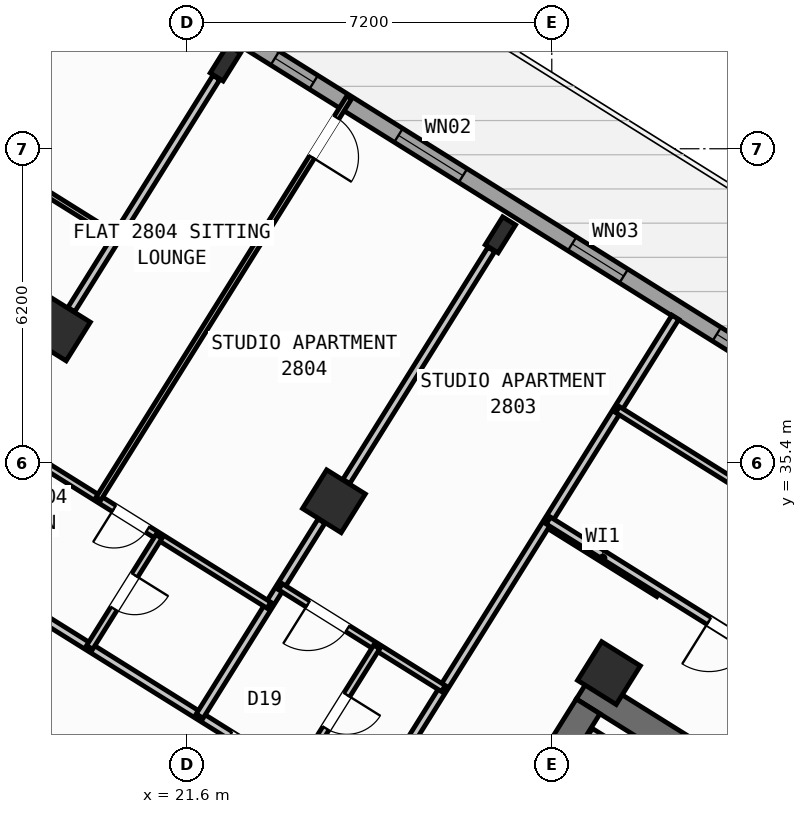
"""IFC4 building model, lengths in metres.
Left out: names, types, materials, properties, quantities, classifications, styles, units other than length and angle.
Written with IfcOpenShell. Run it as: python <this file> out.ifc"""

import sys

from ifc_helpers import new_model, si_unit, direction, frame, frame_2d, origin, origin_2d, place, context, subcontext, project, spatial, rectangle, hollow_rectangle, i_section, extrude, source, transform, mapped, element, fill, save


model = new_model("IFC4")
c1 = context("Model", 3, precision=1e-05, world=origin(), true_north=direction((0.0, 1.0)))
c2 = subcontext(c1, "Body", "Model", "MODEL_VIEW")
j1 = project(units=[si_unit("LENGTHUNIT", "METRE"), si_unit("PLANEANGLEUNIT", "RADIAN")], contexts=[c1])
p1 = place(None, origin())
s1 = spatial("IfcSite", under=j1, at=p1, CompositionType="ELEMENT")
p2 = place(p1, origin())
s2 = spatial("IfcBuilding", under=s1, at=p2, CompositionType="ELEMENT")
p3 = place(p2, frame((0.0, 0.0, 112.5)))
s3 = spatial("IfcBuildingStorey", under=s2, at=p3, CompositionType="ELEMENT", Elevation=112.5)
p4 = place(p3, frame((40.573, 24.01, 0.0), z_axis=(0.0, 0.0, 1.0), x_axis=(-0.848047359947, 0.529920442413, 0.0)))
e1 = element("IfcWall", 1, at=p4, inside=s3, PredefinedType="SHEAR", context=c2, shape_type="SweptSolid", body=[
    extrude(rectangle(XDim=13.14, YDim=0.55, at=frame_2d((6.57, 0.0))), origin(), (0.0, 0.0, 1.0), 3.35),
])
p5 = place(p3, frame((29.517, 30.594, 0.0), z_axis=(0.0, 0.0, 1.0), x_axis=(-0.529906864564, -0.848055844204, 0.0)))
e2 = element("IfcWall", 2, at=p5, inside=s3, PredefinedType="SHEAR", context=c2, shape_type="SweptSolid", body=[
    extrude(rectangle(XDim=3.575, YDim=0.55, at=frame_2d((1.788, 0.0))), origin(), (0.0, 0.0, 1.0), 3.35),
])
m1 = source(origin(), c2, "Body", "SweptSolid", [
    extrude(hollow_rectangle(XDim=0.9, YDim=0.9, WallThickness=0.036, at=origin_2d()), origin(), (0.0, 0.0, 1.0), 3.6),
])
p6 = place(p3, frame((29.928, 31.251, 0.0), z_axis=(0.0, 0.0, 1.0), x_axis=(-0.848048096156, 0.529919264233, 0.0)))
e3 = element("IfcColumn", 3, at=p6, inside=s3, PredefinedType="COLUMN", context=c2, shape_type="MappedRepresentation", body=[
    mapped(m1, transform((0.0, 0.0, 0.0), scale=1.0)),
])
m2 = source(origin(), c2, "Body", "SweptSolid", [
    extrude(i_section(OverallWidth=0.3, OverallDepth=0.65, WebThickness=0.016, FlangeThickness=0.031, at=origin_2d()), origin(), (0.0, 0.0, 1.0), 3.6),
])
p7 = place(p3, frame((27.786, 39.901, 0.0), z_axis=(0.0, 0.0, 1.0), x_axis=(-0.848048096156, 0.529919264233, 0.0)))
e4 = element("IfcColumn", 4, at=p7, inside=s3, PredefinedType="COLUMN", context=c2, shape_type="MappedRepresentation", body=[
    mapped(m2, transform((0.0, 0.0, 0.0), scale=1.0)),
])
p8 = place(p3, frame((24.5, 34.643, 0.0), z_axis=(0.0, 0.0, 1.0), x_axis=(-0.848048096156, 0.529919264233, 0.0)))
e5 = element("IfcColumn", 5, at=p8, inside=s3, PredefinedType="COLUMN", context=c2, shape_type="MappedRepresentation", body=[
    mapped(m1, transform((0.0, 0.0, 0.0), scale=1.0)),
])
p9 = place(p3, frame((22.358, 43.292, 0.0), z_axis=(0.0, 0.0, 1.0), x_axis=(-0.848048096156, 0.529919264233, 0.0)))
e6 = element("IfcColumn", 6, at=p9, inside=s3, PredefinedType="COLUMN", context=c2, shape_type="MappedRepresentation", body=[
    mapped(m2, transform((0.0, 0.0, 0.0), scale=1.0)),
])
p10 = place(p3, frame((19.073, 38.034, 0.0), z_axis=(0.0, 0.0, 1.0), x_axis=(-0.848048096156, 0.529919264233, 0.0)))
e7 = element("IfcColumn", 7, at=p10, inside=s3, PredefinedType="COLUMN", context=c2, shape_type="MappedRepresentation", body=[
    mapped(m1, transform((0.0, 0.0, 0.0), scale=1.0)),
])
p11 = place(p3, frame((17.424, 47.083, 0.0), z_axis=(0.0, 0.0, 1.0), x_axis=(0.848049927979, -0.529916332693, 0.0)))
e8 = element("IfcWall", 8, at=p11, inside=s3, PredefinedType="STANDARD", context=c2, shape_type="SweptSolid", body=[
    extrude(rectangle(XDim=29.223, YDim=0.32, at=frame_2d((14.612, 0.0))), origin(), (0.0, 0.0, 1.0), 3.35),
])
p12 = place(p11, frame((3.77, 0.0, 0.0)))
e9 = element("IfcOpeningElement", 9, at=p12, cuts=e8, PredefinedType="OPENING", context=c2, shape_type="SweptSolid", body=[
    extrude(rectangle(XDim=1.05, YDim=2.15, at=frame_2d((0.525, 1.075))), frame((0.0, 0.17, 0.0), z_axis=(0.0, -1.0, 0.0), x_axis=(1.0, 0.0, 0.0)), (0.0, 0.0, 1.0), 0.34),
])
p13 = place(p11, frame((0.9, 0.0, 0.8)))
e10 = element("IfcOpeningElement", 10, at=p13, cuts=e8, PredefinedType="OPENING", context=c2, shape_type="SweptSolid", body=[
    extrude(rectangle(XDim=2.1, YDim=1.55, at=frame_2d((1.05, 0.775))), frame((0.0, 0.17, 0.0), z_axis=(0.0, -1.0, 0.0), x_axis=(1.0, 0.0, 0.0)), (0.0, 0.0, 1.0), 0.34),
])
p14 = place(p11, frame((6.972, 0.0, 1.0)))
e11 = element("IfcOpeningElement", 11, at=p14, cuts=e8, PredefinedType="OPENING", context=c2, shape_type="SweptSolid", body=[
    extrude(rectangle(XDim=0.9, YDim=1.25, at=frame_2d((0.45, 0.625))), frame((0.0, 0.17, 0.0), z_axis=(0.0, -1.0, 0.0), x_axis=(1.0, 0.0, 0.0)), (0.0, 0.0, 1.0), 0.34),
])
p15 = place(p11, frame((9.847, 0.0, 0.85)))
e12 = element("IfcOpeningElement", 12, at=p15, cuts=e8, PredefinedType="OPENING", context=c2, shape_type="SweptSolid", body=[
    extrude(rectangle(XDim=1.5, YDim=1.5, at=frame_2d((0.75, 0.75))), frame((0.0, 0.17, 0.0), z_axis=(0.0, -1.0, 0.0), x_axis=(1.0, 0.0, 0.0)), (0.0, 0.0, 1.0), 0.34),
])
p16 = place(p11, frame((13.889, 0.0, 0.95)))
e13 = element("IfcOpeningElement", 13, at=p16, cuts=e8, PredefinedType="OPENING", context=c2, shape_type="SweptSolid", body=[
    extrude(rectangle(XDim=1.2, YDim=1.4, at=frame_2d((0.6, 0.7))), frame((0.0, 0.17, 0.0), z_axis=(0.0, -1.0, 0.0), x_axis=(1.0, 0.0, 0.0)), (0.0, 0.0, 1.0), 0.34),
])
p17 = place(p11, frame((17.254, 0.0, 1.0)))
e14 = element("IfcOpeningElement", 14, at=p17, cuts=e8, PredefinedType="OPENING", context=c2, shape_type="SweptSolid", body=[
    extrude(rectangle(XDim=0.9, YDim=1.25, at=frame_2d((0.45, 0.625))), frame((0.0, 0.17, 0.0), z_axis=(0.0, -1.0, 0.0), x_axis=(1.0, 0.0, 0.0)), (0.0, 0.0, 1.0), 0.34),
])
p18 = place(p11, frame((20.764, 0.0, 0.8)))
e15 = element("IfcOpeningElement", 15, at=p18, cuts=e8, PredefinedType="OPENING", context=c2, shape_type="SweptSolid", body=[
    extrude(rectangle(XDim=2.1, YDim=1.55, at=frame_2d((1.05, 0.775))), frame((0.0, 0.17, 0.0), z_axis=(0.0, -1.0, 0.0), x_axis=(1.0, 0.0, 0.0)), (0.0, 0.0, 1.0), 0.34),
])
p19 = place(p11, frame((25.403, 0.0, 0.8)))
e16 = element("IfcOpeningElement", 16, at=p19, cuts=e8, PredefinedType="OPENING", context=c2, shape_type="SweptSolid", body=[
    extrude(rectangle(XDim=2.1, YDim=1.55, at=frame_2d((1.05, 0.775))), frame((0.0, 0.17, 0.0), z_axis=(0.0, -1.0, 0.0), x_axis=(1.0, 0.0, 0.0)), (0.0, 0.0, 1.0), 0.34),
])
p20 = place(p3, frame((33.363, 27.69, 0.0), z_axis=(0.0, 0.0, 1.0), x_axis=(-0.848047090064, 0.529920874315, 0.0)))
e17 = element("IfcWall", 17, at=p20, inside=s3, PredefinedType="STANDARD", context=c2, shape_type="SweptSolid", body=[
    extrude(rectangle(XDim=4.498, YDim=0.2, at=frame_2d((2.249, 0.0))), origin(), (0.0, 0.0, 1.0), 3.34),
])
p21 = place(p3, frame((30.914, 32.829, 0.0), z_axis=(0.0, 0.0, 1.0), x_axis=(-0.848008813643, 0.529982124211, 0.0)))
e18 = element("IfcWall", 18, at=p21, inside=s3, PredefinedType="PARTITIONING", context=c2, shape_type="SweptSolid", body=[
    extrude(rectangle(XDim=2.61, YDim=0.16, at=frame_2d((1.305, 0.0))), origin(), (0.0, 0.0, 1.0), 3.34),
])
p22 = place(p3, frame((31.239, 38.274, 0.0), z_axis=(0.0, 0.0, 1.0), x_axis=(-0.529925472745, -0.848044216616, 0.0)))
e19 = element("IfcWall", 19, at=p22, inside=s3, PredefinedType="PARTITIONING", context=c2, shape_type="SweptSolid", body=[
    extrude(rectangle(XDim=11.65, YDim=0.16, at=frame_2d((5.825, 0.0))), origin(), (0.0, 0.0, 1.0), 3.34),
])
p23 = place(p3, frame((25.065, 28.394, 0.0), z_axis=(0.0, 0.0, 1.0), x_axis=(-0.848048310262, 0.529918921593, 0.0)))
e20 = element("IfcWall", 20, at=p23, inside=s3, PredefinedType="PARTITIONING", context=c2, shape_type="SweptSolid", body=[
    extrude(rectangle(XDim=16.73, YDim=0.16, at=frame_2d((8.365, 0.0))), origin(), (0.0, 0.0, 1.0), 3.34),
])
p24 = place(p23, frame((2.22, 0.0, 0.0)))
e21 = element("IfcOpeningElement", 21, at=p24, cuts=e20, PredefinedType="OPENING", context=c2, shape_type="SweptSolid", body=[
    extrude(rectangle(XDim=0.86, YDim=2.05, at=frame_2d((0.43, 1.025))), frame((0.0, 0.09, 0.0), z_axis=(0.0, -1.0, 0.0), x_axis=(1.0, 0.0, 0.0)), (0.0, 0.0, 1.0), 0.18),
])
p25 = place(p23, frame((7.82, 0.0, 0.0)))
e22 = element("IfcOpeningElement", 22, at=p25, cuts=e20, PredefinedType="OPENING", context=c2, shape_type="SweptSolid", body=[
    extrude(rectangle(XDim=1.0, YDim=2.1, at=frame_2d((0.5, 1.05))), frame((0.0, 0.09, 0.0), z_axis=(0.0, -1.0, 0.0), x_axis=(1.0, 0.0, 0.0)), (0.0, 0.0, 1.0), 0.18),
])
p26 = place(p23, frame((12.95, 0.0, 0.0)))
e23 = element("IfcOpeningElement", 23, at=p26, cuts=e20, PredefinedType="OPENING", context=c2, shape_type="SweptSolid", body=[
    extrude(rectangle(XDim=1.0, YDim=2.1, at=frame_2d((0.5, 1.05))), frame((0.0, 0.09, 0.0), z_axis=(0.0, -1.0, 0.0), x_axis=(1.0, 0.0, 0.0)), (0.0, 0.0, 1.0), 0.18),
])
p27 = place(p3, frame((20.293, 28.782, 0.0), z_axis=(0.0, 0.0, 1.0), x_axis=(-0.848040881926, 0.529930809241, 0.0)))
e24 = element("IfcWall", 24, at=p27, inside=s3, PredefinedType="PARTITIONING", context=c2, shape_type="SweptSolid", body=[
    extrude(rectangle(XDim=5.476, YDim=0.16, at=frame_2d((2.738, 0.0))), origin(), (0.0, 0.0, 1.0), 2.775),
])
p28 = place(p27, frame((3.568, 0.0, 0.0)))
e25 = element("IfcOpeningElement", 25, at=p28, cuts=e24, PredefinedType="OPENING", context=c2, shape_type="SweptSolid", body=[
    extrude(rectangle(XDim=1.0, YDim=2.1, at=frame_2d((0.5, 1.05))), frame((0.0, 0.09, 0.0), z_axis=(0.0, -1.0, 0.0), x_axis=(1.0, 0.0, 0.0)), (0.0, 0.0, 1.0), 0.18),
])
p29 = place(p3, frame((27.607, 39.615, 0.0), z_axis=(0.0, 0.0, 1.0), x_axis=(-0.529913610495, -0.848051628978, 0.0)))
e26 = element("IfcWall", 26, at=p29, inside=s3, PredefinedType="PARTITIONING", context=c2, shape_type="SweptSolid", body=[
    extrude(rectangle(XDim=5.401, YDim=0.16, at=frame_2d((2.7, 0.0))), origin(), (0.0, 0.0, 1.0), 2.775),
])
p30 = place(p3, frame((24.256, 34.251, 0.0), z_axis=(0.0, 0.0, 1.0), x_axis=(-0.529926399231, -0.848043637673, 0.0)))
e27 = element("IfcWall", 27, at=p30, inside=s3, PredefinedType="PARTITIONING", context=c2, shape_type="SweptSolid", body=[
    extrude(rectangle(XDim=4.538, YDim=0.16, at=frame_2d((2.269, 0.0))), origin(), (0.0, 0.0, 1.0), 2.775),
])
p31 = place(p3, frame((26.66, 30.947, 0.0), z_axis=(0.0, 0.0, 1.0), x_axis=(-0.84803087207, 0.529946827537, 0.0)))
e28 = element("IfcWall", 28, at=p31, inside=s3, PredefinedType="PLUMBINGWALL", context=c2, shape_type="SweptSolid", body=[
    extrude(rectangle(XDim=3.79, YDim=0.14, at=frame_2d((1.895, 0.0))), origin(), (0.0, 0.0, 1.0), 3.34),
])
p32 = place(p31, frame((2.23, 0.0, 0.0)))
e29 = element("IfcOpeningElement", 29, at=p32, cuts=e28, PredefinedType="OPENING", context=c2, shape_type="SweptSolid", body=[
    extrude(rectangle(XDim=0.92, YDim=2.08, at=frame_2d((0.46, 1.04))), frame((0.0, 0.08, 0.0), z_axis=(0.0, -1.0, 0.0), x_axis=(1.0, 0.0, 0.0)), (0.0, 0.0, 1.0), 0.16),
])
p33 = place(p3, frame((25.345, 31.768, 0.0), z_axis=(0.0, 0.0, 1.0), x_axis=(-0.529882284462, -0.848071202561, 0.0)))
e30 = element("IfcWall", 30, at=p33, inside=s3, PredefinedType="PLUMBINGWALL", context=c2, shape_type="SweptSolid", body=[
    extrude(rectangle(XDim=3.01, YDim=0.14, at=frame_2d((1.505, 0.0))), origin(), (0.0, 0.0, 1.0), 2.995),
])
p34 = place(p33, frame((1.115, 0.0, 0.0)))
e31 = element("IfcOpeningElement", 31, at=p34, cuts=e30, PredefinedType="OPENING", context=c2, shape_type="SweptSolid", body=[
    extrude(rectangle(XDim=0.78, YDim=2.05, at=frame_2d((0.39, 1.025))), frame((0.0, 0.08, 0.0), z_axis=(0.0, -1.0, 0.0), x_axis=(1.0, 0.0, 0.0)), (0.0, 0.0, 1.0), 0.16),
])
p35 = place(p3, frame((22.18, 43.006, 0.0), z_axis=(0.0, 0.0, 1.0), x_axis=(-0.529913610495, -0.848051628978, 0.0)))
e32 = element("IfcWall", 32, at=p35, inside=s3, PredefinedType="PARTITIONING", context=c2, shape_type="SweptSolid", body=[
    extrude(rectangle(XDim=5.401, YDim=0.16, at=frame_2d((2.7, 0.0))), origin(), (0.0, 0.0, 1.0), 2.775),
])
p36 = place(p3, frame((23.218, 32.591, 0.0), z_axis=(0.0, 0.0, 1.0), x_axis=(-0.848056163074, 0.529906354247, 0.0)))
e33 = element("IfcWall", 33, at=p36, inside=s3, PredefinedType="PLUMBINGWALL", context=c2, shape_type="SweptSolid", body=[
    extrude(rectangle(XDim=6.4, YDim=0.14, at=frame_2d((3.2, 0.0))), origin(), (0.0, 0.0, 1.0), 3.34),
])
p37 = place(p36, frame((2.824, 0.0, 0.0)))
e34 = element("IfcOpeningElement", 34, at=p37, cuts=e33, PredefinedType="OPENING", context=c2, shape_type="SweptSolid", body=[
    extrude(rectangle(XDim=0.78, YDim=2.05, at=frame_2d((0.39, 1.025))), frame((0.0, 0.08, 0.0), z_axis=(0.0, -1.0, 0.0), x_axis=(1.0, 0.0, 0.0)), (0.0, 0.0, 1.0), 0.16),
])
p38 = place(p3, frame((21.047, 33.947, 0.0), z_axis=(0.0, 0.0, 1.0), x_axis=(-0.529913878929, -0.848051461244, 0.0)))
e35 = element("IfcWall", 35, at=p38, inside=s3, PredefinedType="PLUMBINGWALL", context=c2, shape_type="SweptSolid", body=[
    extrude(rectangle(XDim=2.58, YDim=0.14, at=frame_2d((1.29, 0.0))), origin(), (0.0, 0.0, 1.0), 3.34),
])
p39 = place(p38, frame((0.9, 0.0, 0.0)))
e36 = element("IfcOpeningElement", 36, at=p39, cuts=e35, PredefinedType="OPENING", context=c2, shape_type="SweptSolid", body=[
    extrude(rectangle(XDim=0.78, YDim=2.05, at=frame_2d((0.39, 1.025))), frame((0.0, 0.08, 0.0), z_axis=(0.0, -1.0, 0.0), x_axis=(1.0, 0.0, 0.0)), (0.0, 0.0, 1.0), 0.16),
])
p40 = place(p3, frame((24.802, 42.614, 0.0), z_axis=(0.0, 0.0, 1.0), x_axis=(-0.529926099889, -0.848043824727, 0.0)))
e37 = element("IfcWall", 37, at=p40, inside=s3, PredefinedType="PARTITIONING", context=c2, shape_type="SweptSolid", body=[
    extrude(rectangle(XDim=9.34, YDim=0.11, at=frame_2d((4.67, 0.0))), origin(), (0.0, 0.0, 1.0), 3.34),
])
p41 = place(p40, frame((0.47, 0.0, 0.0)))
e38 = element("IfcOpeningElement", 38, at=p41, cuts=e37, PredefinedType="OPENING", context=c2, shape_type="SweptSolid", body=[
    extrude(rectangle(XDim=0.92, YDim=2.08, at=frame_2d((0.46, 1.04))), frame((0.0, 0.065, 0.0), z_axis=(0.0, -1.0, 0.0), x_axis=(1.0, 0.0, 0.0)), (0.0, 0.0, 1.0), 0.13),
])
p42 = place(p3, frame((20.213, 39.859, 0.0), z_axis=(0.0, 0.0, 1.0), x_axis=(-0.848048787466, 0.529918157905, 0.0)))
e39 = element("IfcWall", 39, at=p42, inside=s3, PredefinedType="PARTITIONING", context=c2, shape_type="SweptSolid", body=[
    extrude(rectangle(XDim=6.52, YDim=0.11, at=frame_2d((3.26, 0.0))), origin(), (0.0, 0.0, 1.0), 3.34),
])
p43 = place(p42, frame((2.8, 0.0, 0.0)))
e40 = element("IfcOpeningElement", 40, at=p43, cuts=e39, PredefinedType="OPENING", context=c2, shape_type="SweptSolid", body=[
    extrude(rectangle(XDim=0.92, YDim=2.08, at=frame_2d((0.46, 1.04))), frame((0.0, 0.065, 0.0), z_axis=(0.0, -1.0, 0.0), x_axis=(1.0, 0.0, 0.0)), (0.0, 0.0, 1.0), 0.13),
])
p44 = place(p3, frame((41.936, 26.012, 0.0), z_axis=(0.0, 0.0, 1.0), x_axis=(-0.848051154596, 0.529914369676, 0.0)))
e41 = element("IfcWall", 41, at=p44, inside=s3, PredefinedType="PARTITIONING", context=c2, shape_type="SweptSolid", body=[
    extrude(rectangle(XDim=15.57, YDim=0.16, at=frame_2d((7.785, 0.0))), origin(), (0.0, 0.0, 1.0), 3.34),
])
p45 = place(p44, frame((10.83, 0.0, 0.0)))
e42 = element("IfcOpeningElement", 42, at=p45, cuts=e41, PredefinedType="OPENING", context=c2, shape_type="SweptSolid", body=[
    extrude(rectangle(XDim=1.0, YDim=2.1, at=frame_2d((0.5, 1.05))), frame((0.0, 0.09, 0.0), z_axis=(0.0, -1.0, 0.0), x_axis=(1.0, 0.0, 0.0)), (0.0, 0.0, 1.0), 0.18),
])
p46 = place(p3, frame((42.226, 28.873, 0.0), z_axis=(0.0, 0.0, 1.0), x_axis=(-0.848049134363, 0.529917602752, 0.0)))
e43 = element("IfcWall", 43, at=p46, inside=s3, PredefinedType="PLUMBINGWALL", context=c2, shape_type="SweptSolid", body=[
    extrude(rectangle(XDim=14.3, YDim=0.14, at=frame_2d((7.15, 0.0))), origin(), (0.0, 0.0, 1.0), 3.34),
])
p47 = place(p46, frame((9.57, 0.0, 0.0)))
e44 = element("IfcOpeningElement", 44, at=p47, cuts=e43, PredefinedType="OPENING", context=c2, shape_type="SweptSolid", body=[
    extrude(rectangle(XDim=0.92, YDim=2.08, at=frame_2d((0.46, 1.04))), frame((0.0, 0.08, 0.0), z_axis=(0.0, -1.0, 0.0), x_axis=(1.0, 0.0, 0.0)), (0.0, 0.0, 1.0), 0.16),
])
m3 = source(origin(), c2, "Body", "SweptSolid", [
    extrude(rectangle(XDim=0.9, YDim=1.25, at=frame_2d((0.45, 0.625))), frame((0.0, 0.03, 0.0), z_axis=(0.0, -1.0, 0.0), x_axis=(1.0, 0.0, 0.0)), (0.0, 0.0, 1.0), 0.06),
])
p48 = place(p14, origin())
e45 = element("IfcWindow", 45, at=p48, inside=s3, PartitioningType="SINGLE_PANEL", PredefinedType="WINDOW", context=c2, shape_type="MappedRepresentation", body=[
    mapped(m3, transform((0.0, 0.0, 0.0), scale=1.0)),
])
fill(e11, e45)
m4 = source(origin(), c2, "Body", "SweptSolid", [
    extrude(rectangle(XDim=1.5, YDim=1.5, at=frame_2d((0.75, 0.75))), frame((0.0, 0.03, 0.0), z_axis=(0.0, -1.0, 0.0), x_axis=(1.0, 0.0, 0.0)), (0.0, 0.0, 1.0), 0.06),
])
p49 = place(p15, origin())
e46 = element("IfcWindow", 46, at=p49, inside=s3, PartitioningType="SINGLE_PANEL", PredefinedType="WINDOW", context=c2, shape_type="MappedRepresentation", body=[
    mapped(m4, transform((0.0, 0.0, 0.0), scale=1.0)),
])
fill(e12, e46)
m5 = source(origin(), c2, "Body", "SweptSolid", [
    extrude(rectangle(XDim=1.2, YDim=1.4, at=frame_2d((0.6, 0.7))), frame((0.0, 0.03, 0.0), z_axis=(0.0, -1.0, 0.0), x_axis=(1.0, 0.0, 0.0)), (0.0, 0.0, 1.0), 0.06),
])
p50 = place(p16, origin())
e47 = element("IfcWindow", 47, at=p50, inside=s3, PartitioningType="SINGLE_PANEL", PredefinedType="WINDOW", context=c2, shape_type="MappedRepresentation", body=[
    mapped(m5, transform((0.0, 0.0, 0.0), scale=1.0)),
])
fill(e13, e47)
p51 = place(p17, origin())
e48 = element("IfcWindow", 48, at=p51, inside=s3, PartitioningType="SINGLE_PANEL", PredefinedType="WINDOW", context=c2, shape_type="MappedRepresentation", body=[
    mapped(m3, transform((0.0, 0.0, 0.0), scale=1.0)),
])
fill(e14, e48)
m6 = source(origin(), c2, "Body", "SweptSolid", [
    extrude(rectangle(XDim=0.92, YDim=2.08, at=frame_2d((0.46, 1.04))), frame((0.0, 0.025, 0.0), z_axis=(0.0, -1.0, 0.0), x_axis=(1.0, 0.0, 0.0)), (0.0, 0.0, 1.0), 0.05),
])
p52 = place(p32, origin())
e49 = element("IfcDoor", 49, at=p52, inside=s3, OperationType="SINGLE_SWING_RIGHT", PredefinedType="DOOR", context=c2, shape_type="MappedRepresentation", body=[
    mapped(m6, transform((0.0, 0.0, 0.0), scale=1.0)),
])
fill(e29, e49)
m7 = source(origin(), c2, "Body", "SweptSolid", [
    extrude(rectangle(XDim=0.78, YDim=2.05, at=frame_2d((0.39, 1.025))), frame((0.0, 0.025, 0.0), z_axis=(0.0, -1.0, 0.0), x_axis=(1.0, 0.0, 0.0)), (0.0, 0.0, 1.0), 0.05),
])
p53 = place(p34, origin())
e50 = element("IfcDoor", 50, at=p53, inside=s3, OperationType="SINGLE_SWING_LEFT", PredefinedType="DOOR", context=c2, shape_type="MappedRepresentation", body=[
    mapped(m7, transform((0.0, 0.0, 0.0), scale=1.0)),
])
fill(e31, e50)
p54 = place(p41, origin())
e51 = element("IfcDoor", 51, at=p54, inside=s3, OperationType="SINGLE_SWING_RIGHT", PredefinedType="DOOR", context=c2, shape_type="MappedRepresentation", body=[
    mapped(m6, transform((0.0, 0.0, 0.0), scale=1.0)),
])
fill(e38, e51)
p55 = place(p37, origin())
e52 = element("IfcDoor", 52, at=p55, inside=s3, OperationType="SINGLE_SWING_RIGHT", PredefinedType="DOOR", context=c2, shape_type="MappedRepresentation", body=[
    mapped(m7, transform((0.0, 0.0, 0.0), scale=1.0)),
])
fill(e34, e52)
p56 = place(p39, origin())
e53 = element("IfcDoor", 53, at=p56, inside=s3, OperationType="SINGLE_SWING_LEFT", PredefinedType="DOOR", context=c2, shape_type="MappedRepresentation", body=[
    mapped(m7, transform((0.0, 0.0, 0.0), scale=1.0)),
])
fill(e36, e53)
m8 = source(origin(), c2, "Body", "SweptSolid", [
    extrude(rectangle(XDim=1.0, YDim=2.1, at=frame_2d((0.5, 1.05))), frame((0.0, 0.025, 0.0), z_axis=(0.0, -1.0, 0.0), x_axis=(1.0, 0.0, 0.0)), (0.0, 0.0, 1.0), 0.05),
])
p57 = place(p45, origin())
e54 = element("IfcDoor", 54, at=p57, inside=s3, OperationType="SINGLE_SWING_RIGHT", PredefinedType="DOOR", context=c2, shape_type="MappedRepresentation", body=[
    mapped(m8, transform((0.0, 0.0, 0.0), scale=1.0)),
])
fill(e42, e54)
save(model, sys.argv[1])
